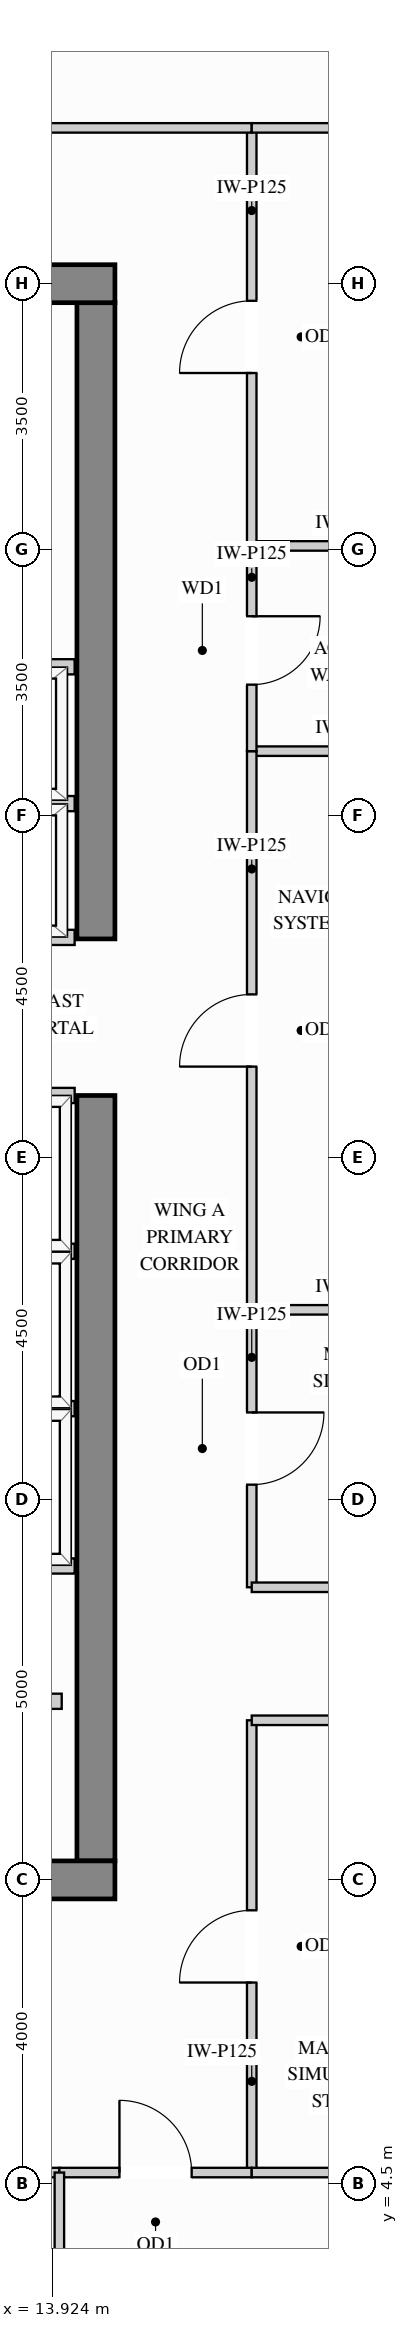
"""IFC4 building model, lengths in metres.
Left out: names, types, materials, properties, quantities, classifications, styles, units other than length and angle.
Written with IfcOpenShell. Run it as: python <this file> out.ifc"""

import sys

from ifc_helpers import new_model, si_unit, direction, frame, frame_2d, origin, place, context, subcontext, project, spatial, rectangle, extrude, source, transform, mapped, element, fill, save


model = new_model("IFC4")
c1 = context("Model", 3, precision=1e-05, world=origin(), true_north=direction((0.0, 1.0)))
c2 = subcontext(c1, "Body", "Model", "MODEL_VIEW")
j1 = project(units=[si_unit("LENGTHUNIT", "METRE"), si_unit("PLANEANGLEUNIT", "RADIAN")], contexts=[c1])
p1 = place(None, origin())
s1 = spatial("IfcSite", under=j1, at=p1, CompositionType="ELEMENT")
p2 = place(p1, origin())
s2 = spatial("IfcBuilding", under=s1, at=p2, CompositionType="ELEMENT")
p3 = place(p2, frame((0.0, 0.0, 234.0)))
s3 = spatial("IfcBuildingStorey", under=s2, at=p3, CompositionType="ELEMENT", Elevation=234.0)
m1 = source(origin(), c2, "Body", "SweptSolid", [
    extrude(rectangle(XDim=10.07, YDim=0.5, at=frame_2d((5.035, 0.0))), origin(), (0.0, 0.0, 1.0), 3.4),
])
p4 = place(p3, frame((14.5, 8.75, 0.0), z_axis=(0.0, 0.0, 1.0), x_axis=(0.0, 1.0, 0.0)))
e1 = element("IfcWall", 1, at=p4, inside=s3, PredefinedType="SHEAR", context=c2, shape_type="MappedRepresentation", body=[
    mapped(m1, transform((0.0, 0.0, 0.0), x_axis=(1.0, 0.0, 0.0), y_axis=(0.0, 1.0, 0.0), z_axis=(0.0, 0.0, 1.0))),
])
m2 = source(origin(), c2, "Body", "SweptSolid", [
    extrude(rectangle(XDim=8.37, YDim=0.5, at=frame_2d((4.185, 0.0))), origin(), (0.0, 0.0, 1.0), 3.4),
])
p5 = place(p3, frame((14.5, 20.88, 0.0), z_axis=(0.0, 0.0, 1.0), x_axis=(0.0, 1.0, 0.0)))
e2 = element("IfcWall", 2, at=p5, inside=s3, PredefinedType="SHEAR", context=c2, shape_type="MappedRepresentation", body=[
    mapped(m2, transform((0.0, 0.0, 0.0), x_axis=(1.0, 0.0, 0.0), y_axis=(0.0, 1.0, 0.0), z_axis=(0.0, 0.0, 1.0))),
])
m3 = source(origin(), c2, "Body", "SweptSolid", [
    extrude(rectangle(XDim=10.5, YDim=0.5, at=frame_2d((5.25, 0.0))), origin(), (0.0, 0.0, 1.0), 3.4),
])
for number, where, z_axis, x_axis in (
    (3, (4.25, 29.5, 0.0), (0.0, 0.0, 1.0), (1.0, 0.0, 0.0)),
    (4, (4.25, 8.5, 0.0), (0.0, 0.0, 1.0), (1.0, 0.0, 0.0)),
):
    element("IfcWall", number, at=place(p3, frame(where, z_axis=z_axis, x_axis=x_axis)), inside=s3, PredefinedType="SHEAR", context=c2, shape_type="MappedRepresentation", body=[
        mapped(m3, transform((0.0, 0.0, 0.0), x_axis=(1.0, 0.0, 0.0), y_axis=(0.0, 1.0, 0.0), z_axis=(0.0, 0.0, 1.0))),
    ])
m4 = source(origin(), c2, "Body", "SweptSolid", [
    extrude(rectangle(XDim=2.6, YDim=0.125, at=frame_2d((1.3, 0.0))), origin(), (0.0, 0.0, 1.0), 3.385),
])
p6 = place(p3, frame((16.55, 16.0, 0.0), z_axis=(0.0, 0.0, 1.0), x_axis=(1.0, 0.0, 0.0)))
e5 = element("IfcWall", 5, at=p6, inside=s3, PredefinedType="PARTITIONING", context=c2, shape_type="MappedRepresentation", body=[
    mapped(m4, transform((0.0, 0.0, 0.0), x_axis=(1.0, 0.0, 0.0), y_axis=(0.0, 1.0, 0.0), z_axis=(0.0, 0.0, 1.0))),
])
m5 = source(origin(), c2, "Body", "SweptSolid", [
    extrude(rectangle(XDim=2.598, YDim=0.125, at=frame_2d((1.299, 0.0))), origin(), (0.0, 0.0, 1.0), 3.385),
])
for number, where, z_axis, x_axis in (
    (6, (16.55, 23.35, 0.0), (0.0, 0.0, 1.0), (1.0, 0.0, 0.0)),
    (7, (16.55, 26.05, 0.0), (0.0, 0.0, 1.0), (1.0, 0.0, 0.0)),
):
    element("IfcWall", number, at=place(p3, frame(where, z_axis=z_axis, x_axis=x_axis)), inside=s3, PredefinedType="PARTITIONING", context=c2, shape_type="MappedRepresentation", body=[
        mapped(m5, transform((0.0, 0.0, 0.0), x_axis=(1.0, 0.0, 0.0), y_axis=(0.0, 1.0, 0.0), z_axis=(0.0, 0.0, 1.0))),
    ])
p7 = place(p3, frame((16.55, 12.35, 0.0), z_axis=(0.0, 0.0, 1.0), x_axis=(0.0, 1.0, 0.0)))
e8 = element("IfcWall", 8, at=p7, inside=s3, PredefinedType="PARTITIONING", context=c2, shape_type="SweptSolid", body=[
    extrude(rectangle(XDim=3.65, YDim=0.125, at=frame_2d((1.825, 0.0))), origin(), (0.0, 0.0, 1.0), 3.385),
])
p8 = place(p7, frame((1.35, 0.0, 0.0)))
e9 = element("IfcOpeningElement", 9, at=p8, cuts=e8, PredefinedType="OPENING", context=c2, shape_type="SweptSolid", body=[
    extrude(rectangle(XDim=0.95, YDim=2.15, at=frame_2d((0.475, 1.075))), frame((0.0, 0.073, 0.0), z_axis=(0.0, -1.0, 0.0), x_axis=(1.0, 0.0, 0.0)), (0.0, 0.0, 1.0), 0.145),
])
p9 = place(p3, frame((16.55, 16.0, 0.0), z_axis=(0.0, 0.0, 1.0), x_axis=(0.0, 1.0, 0.0)))
e10 = element("IfcWall", 10, at=p9, inside=s3, PredefinedType="PARTITIONING", context=c2, shape_type="SweptSolid", body=[
    extrude(rectangle(XDim=7.35, YDim=0.125, at=frame_2d((3.675, 0.0))), origin(), (0.0, 0.0, 1.0), 3.385),
])
p10 = place(p9, frame((3.2, 0.0, 0.0)))
e11 = element("IfcOpeningElement", 11, at=p10, cuts=e10, PredefinedType="OPENING", context=c2, shape_type="SweptSolid", body=[
    extrude(rectangle(XDim=0.95, YDim=2.15, at=frame_2d((0.475, 1.075))), frame((0.0, 0.073, 0.0), z_axis=(0.0, -1.0, 0.0), x_axis=(1.0, 0.0, 0.0)), (0.0, 0.0, 1.0), 0.145),
])
p11 = place(p3, frame((16.55, 26.05, 0.0), z_axis=(0.0, 0.0, 1.0), x_axis=(0.0, 1.0, 0.0)))
e12 = element("IfcWall", 12, at=p11, inside=s3, PredefinedType="PARTITIONING", context=c2, shape_type="SweptSolid", body=[
    extrude(rectangle(XDim=5.5, YDim=0.125, at=frame_2d((2.75, 0.0))), origin(), (0.0, 0.0, 1.0), 3.385),
])
p12 = place(p11, frame((2.275, 0.0, 0.0)))
e13 = element("IfcOpeningElement", 13, at=p12, cuts=e12, PredefinedType="OPENING", context=c2, shape_type="SweptSolid", body=[
    extrude(rectangle(XDim=0.95, YDim=2.15, at=frame_2d((0.475, 1.075))), frame((0.0, 0.073, 0.0), z_axis=(0.0, -1.0, 0.0), x_axis=(1.0, 0.0, 0.0)), (0.0, 0.0, 1.0), 0.145),
])
p13 = place(p3, frame((16.55, 4.65, 0.0), z_axis=(0.0, 0.0, 1.0), x_axis=(0.0, 1.0, 0.0)))
e14 = element("IfcWall", 14, at=p13, inside=s3, PredefinedType="PARTITIONING", context=c2, shape_type="SweptSolid", body=[
    extrude(rectangle(XDim=5.95, YDim=0.125, at=frame_2d((2.975, 0.0))), origin(), (0.0, 0.0, 1.0), 3.385),
])
p14 = place(p13, frame((2.5, 0.0, 0.0)))
e15 = element("IfcOpeningElement", 15, at=p14, cuts=e14, PredefinedType="OPENING", context=c2, shape_type="SweptSolid", body=[
    extrude(rectangle(XDim=0.95, YDim=2.15, at=frame_2d((0.475, 1.075))), frame((0.0, 0.073, 0.0), z_axis=(0.0, -1.0, 0.0), x_axis=(1.0, 0.0, 0.0)), (0.0, 0.0, 1.0), 0.145),
])
p15 = place(p3, frame((16.55, 23.35, 0.0), z_axis=(0.0, 0.0, 1.0), x_axis=(0.0, 1.0, 0.0)))
e16 = element("IfcWall", 16, at=p15, inside=s3, PredefinedType="PARTITIONING", context=c2, shape_type="SweptSolid", body=[
    extrude(rectangle(XDim=2.7, YDim=0.125, at=frame_2d((1.35, 0.0))), origin(), (0.0, 0.0, 1.0), 3.385),
])
p16 = place(p15, frame((0.875, 0.0, 0.0)))
e17 = element("IfcOpeningElement", 17, at=p16, cuts=e16, PredefinedType="OPENING", context=c2, shape_type="SweptSolid", body=[
    extrude(rectangle(XDim=0.9, YDim=2.15, at=frame_2d((0.45, 1.075))), frame((0.0, 0.073, 0.0), z_axis=(0.0, -1.0, 0.0), x_axis=(1.0, 0.0, 0.0)), (0.0, 0.0, 1.0), 0.145),
])
p17 = place(p3, frame((2.45, 31.55, 0.0), z_axis=(0.0, 0.0, 1.0), x_axis=(1.0, 0.0, 0.0)))
e18 = element("IfcWall", 18, at=p17, inside=s3, PredefinedType="PARTITIONING", context=c2, shape_type="SweptSolid", body=[
    extrude(rectangle(XDim=14.1, YDim=0.125, at=frame_2d((7.05, 0.0))), origin(), (0.0, 0.0, 1.0), 3.385),
])
p18 = place(p17, frame((6.575, 0.0, 0.0)))
e19 = element("IfcOpeningElement", 19, at=p18, cuts=e18, PredefinedType="OPENING", context=c2, shape_type="SweptSolid", body=[
    extrude(rectangle(XDim=0.95, YDim=2.15, at=frame_2d((0.475, 1.075))), frame((0.0, 0.073, 0.0), z_axis=(0.0, -1.0, 0.0), x_axis=(1.0, 0.0, 0.0)), (0.0, 0.0, 1.0), 0.145),
])
p19 = place(p3, frame((16.55, 31.55, 0.0), z_axis=(0.0, 0.0, 1.0), x_axis=(1.0, 0.0, 0.0)))
e20 = element("IfcWall", 20, at=p19, inside=s3, PredefinedType="PARTITIONING", context=c2, shape_type="MappedRepresentation", body=[
    mapped(m5, transform((0.0, 0.0, 0.0), x_axis=(1.0, 0.0, 0.0), y_axis=(0.0, 1.0, 0.0), z_axis=(0.0, 0.0, 1.0))),
])
m6 = source(origin(), c2, "Body", "SweptSolid", [
    extrude(rectangle(XDim=2.95, YDim=0.125, at=frame_2d((1.475, 0.0))), origin(), (0.0, 0.0, 1.0), 3.385),
])
for number, where, z_axis, x_axis in (
    (21, (16.55, 12.35, 0.0), (0.0, 0.0, 1.0), (1.0, 0.0, 0.0)),
    (22, (16.55, 10.6, 0.0), (0.0, 0.0, 1.0), (1.0, 0.0, 0.0)),
):
    element("IfcWall", number, at=place(p3, frame(where, z_axis=z_axis, x_axis=x_axis)), inside=s3, PredefinedType="PARTITIONING", context=c2, shape_type="MappedRepresentation", body=[
        mapped(m6, transform((0.0, 0.0, 0.0), x_axis=(1.0, 0.0, 0.0), y_axis=(0.0, 1.0, 0.0), z_axis=(0.0, 0.0, 1.0))),
    ])
p20 = place(p3, frame((8.227, 4.65, 0.0), z_axis=(0.0, 0.0, 1.0), x_axis=(1.0, 0.0, 0.0)))
e23 = element("IfcWall", 23, at=p20, inside=s3, PredefinedType="PARTITIONING", context=c2, shape_type="SweptSolid", body=[
    extrude(rectangle(XDim=5.792, YDim=0.125, at=frame_2d((2.896, 0.0))), origin(), (0.0, 0.0, 1.0), 2.848),
])
p21 = place(p20, frame((2.421, 0.0, 0.0)))
e24 = element("IfcOpeningElement", 24, at=p21, cuts=e23, PredefinedType="OPENING", context=c2, shape_type="SweptSolid", body=[
    extrude(rectangle(XDim=0.95, YDim=2.15, at=frame_2d((0.475, 1.075))), frame((0.0, 0.073, 0.0), z_axis=(0.0, -1.0, 0.0), x_axis=(1.0, 0.0, 0.0)), (0.0, 0.0, 1.0), 0.145),
])
p22 = place(p3, frame((14.019, 4.65, 0.0), z_axis=(0.0, 0.0, 1.0), x_axis=(1.0, 0.0, 0.0)))
e25 = element("IfcWall", 25, at=p22, inside=s3, PredefinedType="PARTITIONING", context=c2, shape_type="SweptSolid", body=[
    extrude(rectangle(XDim=2.531, YDim=0.125, at=frame_2d((1.266, 0.0))), origin(), (0.0, 0.0, 1.0), 2.848),
])
p23 = place(p22, frame((0.791, 0.0, 0.0)))
e26 = element("IfcOpeningElement", 26, at=p23, cuts=e25, PredefinedType="OPENING", context=c2, shape_type="SweptSolid", body=[
    extrude(rectangle(XDim=0.95, YDim=2.15, at=frame_2d((0.475, 1.075))), frame((0.0, 0.073, 0.0), z_axis=(0.0, -1.0, 0.0), x_axis=(1.0, 0.0, 0.0)), (0.0, 0.0, 1.0), 0.145),
])
m7 = source(origin(), c2, "Body", "SweptSolid", [
    extrude(rectangle(XDim=2.598, YDim=0.125, at=frame_2d((1.299, 0.0))), origin(), (0.0, 0.0, 1.0), 2.848),
])
p24 = place(p3, frame((16.55, 4.65, 0.0), z_axis=(0.0, 0.0, 1.0), x_axis=(1.0, 0.0, 0.0)))
e27 = element("IfcWall", 27, at=p24, inside=s3, PredefinedType="PARTITIONING", context=c2, shape_type="MappedRepresentation", body=[
    mapped(m7, transform((0.0, 0.0, 0.0), x_axis=(1.0, 0.0, 0.0), y_axis=(0.0, 1.0, 0.0), z_axis=(0.0, 0.0, 1.0))),
])
m8 = source(origin(), c2, "Body", "SweptSolid", [
    extrude(rectangle(XDim=4.298, YDim=0.125, at=frame_2d((2.149, 0.0))), origin(), (0.0, 0.0, 1.0), 3.385),
])
p25 = place(p3, frame((14.019, 0.352, 0.0), z_axis=(0.0, 0.0, 1.0), x_axis=(0.0, 1.0, 0.0)))
e28 = element("IfcWall", 28, at=p25, inside=s3, PredefinedType="PARTITIONING", context=c2, shape_type="MappedRepresentation", body=[
    mapped(m8, transform((0.0, 0.0, 0.0), x_axis=(1.0, 0.0, 0.0), y_axis=(0.0, 1.0, 0.0), z_axis=(0.0, 0.0, 1.0))),
])
m9 = source(origin(), c2, "Body", "SweptSolid", [
    extrude(rectangle(XDim=1.63, YDim=0.2, at=frame_2d((0.815, 0.0))), origin(), (0.0, 0.0, 1.0), 3.385),
])
p26 = place(p3, frame((12.42, 10.85, 0.0), z_axis=(0.0, 0.0, 1.0), x_axis=(1.0, 0.0, 0.0)))
e29 = element("IfcWall", 29, at=p26, inside=s3, PredefinedType="PARTITIONING", context=c2, shape_type="MappedRepresentation", body=[
    mapped(m9, transform((0.0, 0.0, 0.0), x_axis=(1.0, 0.0, 0.0), y_axis=(0.0, 1.0, 0.0), z_axis=(0.0, 0.0, 1.0))),
])
m10 = source(origin(), c2, "Body", "SweptSolid", [
    extrude(rectangle(XDim=2.39, YDim=0.2, at=frame_2d((1.195, 0.0))), origin(), (0.0, 0.0, 1.0), 3.385),
])
for number, where, z_axis, x_axis in (
    (30, (11.83, 22.66, 0.0), (0.0, 0.0, 1.0), (1.0, 0.0, 0.0)),
    (31, (11.83, 20.9, 0.0), (0.0, 0.0, 1.0), (1.0, 0.0, 0.0)),
    (32, (11.83, 24.46, 0.0), (0.0, 0.0, 1.0), (1.0, 0.0, 0.0)),
):
    element("IfcWall", number, at=place(p3, frame(where, z_axis=z_axis, x_axis=x_axis)), inside=s3, PredefinedType="PARTITIONING", context=c2, shape_type="MappedRepresentation", body=[
        mapped(m10, transform((0.0, 0.0, 0.0), x_axis=(1.0, 0.0, 0.0), y_axis=(0.0, 1.0, 0.0), z_axis=(0.0, 0.0, 1.0))),
    ])
m11 = source(origin(), c2, "Body", "SweptSolid", [
    extrude(rectangle(XDim=1.99, YDim=0.2, at=frame_2d((0.995, 0.0))), origin(), (0.0, 0.0, 1.0), 3.385),
])
for number, where, z_axis, x_axis in (
    (33, (12.23, 14.7, 0.0), (0.0, 0.0, 1.0), (1.0, 0.0, 0.0)),
    (34, (12.23, 12.63, 0.0), (0.0, 0.0, 1.0), (1.0, 0.0, 0.0)),
    (35, (12.23, 16.77, 0.0), (0.0, 0.0, 1.0), (1.0, 0.0, 0.0)),
    (36, (12.23, 18.82, 0.0), (0.0, 0.0, 1.0), (1.0, 0.0, 0.0)),
):
    element("IfcWall", number, at=place(p3, frame(where, z_axis=z_axis, x_axis=x_axis)), inside=s3, PredefinedType="PARTITIONING", context=c2, shape_type="MappedRepresentation", body=[
        mapped(m11, transform((0.0, 0.0, 0.0), x_axis=(1.0, 0.0, 0.0), y_axis=(0.0, 1.0, 0.0), z_axis=(0.0, 0.0, 1.0))),
    ])
m12 = source(origin(), c2, "Body", "SweptSolid", [
    extrude(rectangle(XDim=0.95, YDim=2.15, at=frame_2d((0.475, 1.075))), frame((0.0, 0.025, 0.0), z_axis=(0.0, -1.0, 0.0), x_axis=(1.0, 0.0, 0.0)), (0.0, 0.0, 1.0), 0.05),
])
p27 = place(p14, origin())
e37 = element("IfcDoor", 37, at=p27, inside=s3, OperationType="SINGLE_SWING_LEFT", PredefinedType="DOOR", context=c2, shape_type="MappedRepresentation", body=[
    mapped(m12, transform((0.0, 0.0, 0.0), x_axis=(1.0, 0.0, 0.0), y_axis=(0.0, 1.0, 0.0), z_axis=(0.0, 0.0, 1.0))),
])
fill(e15, e37)
p28 = place(p8, origin())
e38 = element("IfcDoor", 38, at=p28, inside=s3, OperationType="SINGLE_SWING_RIGHT", PredefinedType="DOOR", context=c2, shape_type="MappedRepresentation", body=[
    mapped(m12, transform((0.0, 0.0, 0.0), x_axis=(1.0, 0.0, 0.0), y_axis=(0.0, 1.0, 0.0), z_axis=(0.0, 0.0, 1.0))),
])
fill(e9, e38)
p29 = place(p10, origin())
e39 = element("IfcDoor", 39, at=p29, inside=s3, OperationType="SINGLE_SWING_LEFT", PredefinedType="DOOR", context=c2, shape_type="MappedRepresentation", body=[
    mapped(m12, transform((0.0, 0.0, 0.0), x_axis=(1.0, 0.0, 0.0), y_axis=(0.0, 1.0, 0.0), z_axis=(0.0, 0.0, 1.0))),
])
fill(e11, e39)
p30 = place(p12, origin())
e40 = element("IfcDoor", 40, at=p30, inside=s3, OperationType="SINGLE_SWING_LEFT", PredefinedType="DOOR", context=c2, shape_type="MappedRepresentation", body=[
    mapped(m12, transform((0.0, 0.0, 0.0), x_axis=(1.0, 0.0, 0.0), y_axis=(0.0, 1.0, 0.0), z_axis=(0.0, 0.0, 1.0))),
])
fill(e13, e40)
p31 = place(p23, origin())
e41 = element("IfcDoor", 41, at=p31, inside=s3, OperationType="SINGLE_SWING_LEFT", PredefinedType="DOOR", context=c2, shape_type="MappedRepresentation", body=[
    mapped(m12, transform((0.0, 0.0, 0.0), x_axis=(1.0, 0.0, 0.0), y_axis=(0.0, 1.0, 0.0), z_axis=(0.0, 0.0, 1.0))),
])
fill(e26, e41)
m13 = source(origin(), c2, "Body", "SweptSolid", [
    extrude(rectangle(XDim=0.9, YDim=2.15, at=frame_2d((0.45, 1.075))), frame((0.0, 0.025, 0.0), z_axis=(0.0, -1.0, 0.0), x_axis=(1.0, 0.0, 0.0)), (0.0, 0.0, 1.0), 0.05),
])
p32 = place(p16, origin())
e42 = element("IfcDoor", 42, at=p32, inside=s3, OperationType="SINGLE_SWING_RIGHT", PredefinedType="DOOR", context=c2, shape_type="MappedRepresentation", body=[
    mapped(m13, transform((0.0, 0.0, 0.0), x_axis=(1.0, 0.0, 0.0), y_axis=(0.0, 1.0, 0.0), z_axis=(0.0, 0.0, 1.0))),
])
fill(e17, e42)
save(model, sys.argv[1])
